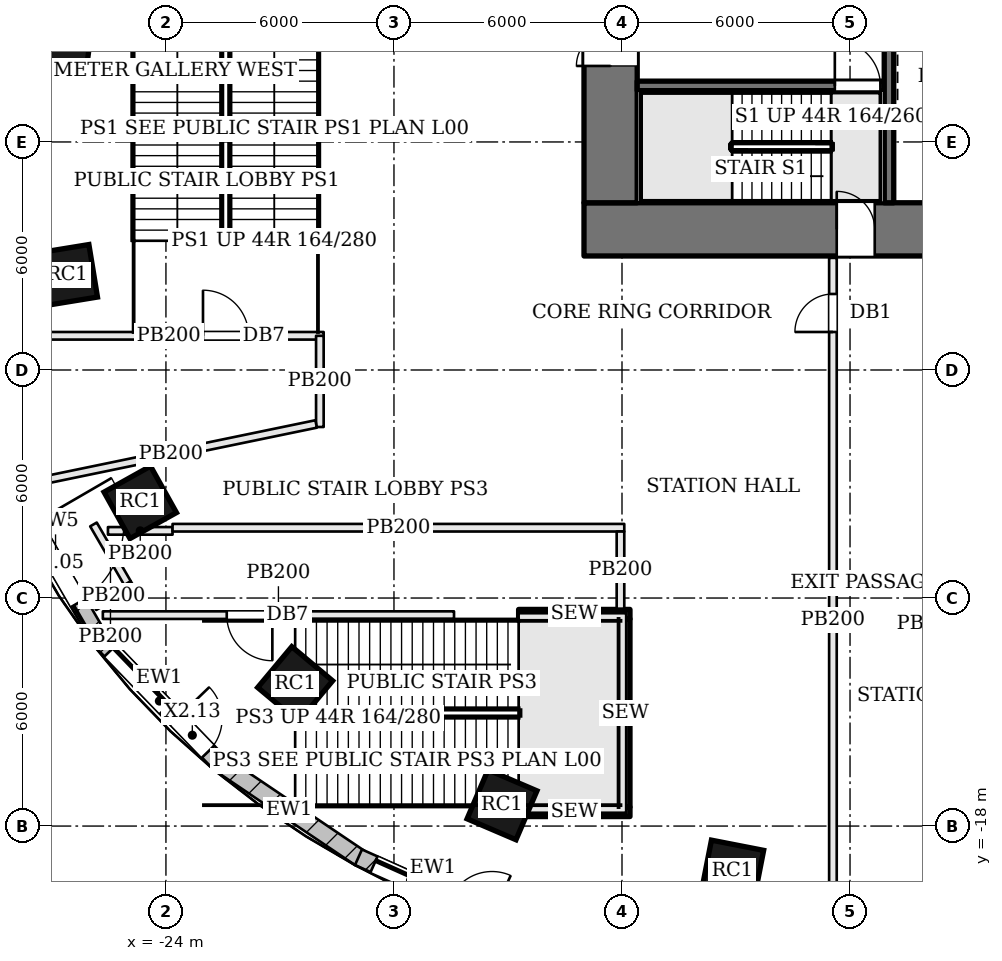
"""IFC4 building model, lengths in metres.
Left out: names, types, materials, properties, quantities, classifications, styles, units other than length and angle.
Written with IfcOpenShell. Run it as: python <this file> out.ifc"""

import sys

from ifc_helpers import new_model, si_unit, direction, frame, frame_2d, origin, origin_2d, place, context, subcontext, project, spatial, rectangle, extrude, element, fill, save


model = new_model("IFC4")
c1 = context("Model", 3, precision=1e-05, world=origin(), true_north=direction((0.0, 1.0)))
c2 = subcontext(c1, "Body", "Model", "MODEL_VIEW")
j1 = project(units=[si_unit("LENGTHUNIT", "METRE"), si_unit("PLANEANGLEUNIT", "RADIAN")], contexts=[c1])
p1 = place(None, origin())
s1 = spatial("IfcSite", under=j1, at=p1, CompositionType="ELEMENT")
p2 = place(p1, origin())
s2 = spatial("IfcBuilding", under=s1, at=p2, CompositionType="ELEMENT")
p3 = place(p2, origin())
s3 = spatial("IfcBuildingStorey", under=s2, at=p3, CompositionType="ELEMENT", Elevation=0.0)
p4 = place(p3, frame((-13.0, -2.3, 0.0), z_axis=(0.0, 0.0, 1.0), x_axis=(1.0, 0.0, 0.0)))
e1 = element("IfcWall", 1, at=p4, inside=s3, PredefinedType="SHEAR", context=c2, shape_type="SweptSolid", body=[
    extrude(rectangle(XDim=26.0, YDim=1.4, at=frame_2d((13.0, 0.0))), origin(), (0.0, 0.0, 1.0), 7.2),
])
p5 = place(p4, frame((9.275, 0.0, 0.0)))
e2 = element("IfcOpeningElement", 2, at=p5, cuts=e1, PredefinedType="OPENING", context=c2, shape_type="SweptSolid", body=[
    extrude(rectangle(XDim=0.9, YDim=2.1, at=frame_2d((0.45, 1.05))), frame((0.0, 0.71, 0.0), z_axis=(0.0, -1.0, 0.0), x_axis=(1.0, 0.0, 0.0)), (0.0, 0.0, 1.0), 1.42),
])
p6 = place(p4, frame((12.525, 0.0, 0.0)))
e3 = element("IfcOpeningElement", 3, at=p6, cuts=e1, PredefinedType="OPENING", context=c2, shape_type="SweptSolid", body=[
    extrude(rectangle(XDim=0.9, YDim=2.1, at=frame_2d((0.45, 1.05))), frame((0.0, 0.71, 0.0), z_axis=(0.0, -1.0, 0.0), x_axis=(1.0, 0.0, 0.0)), (0.0, 0.0, 1.0), 1.42),
])
p7 = place(p4, frame((15.0, 0.0, 0.0)))
e4 = element("IfcOpeningElement", 4, at=p7, cuts=e1, PredefinedType="OPENING", context=c2, shape_type="SweptSolid", body=[
    extrude(rectangle(XDim=1.0, YDim=2.1, at=frame_2d((0.5, 1.05))), frame((0.0, 0.71, 0.0), z_axis=(0.0, -1.0, 0.0), x_axis=(1.0, 0.0, 0.0)), (0.0, 0.0, 1.0), 1.42),
])
p8 = place(p4, frame((16.7, 0.0, 0.0)))
e5 = element("IfcOpeningElement", 5, at=p8, cuts=e1, PredefinedType="OPENING", context=c2, shape_type="SweptSolid", body=[
    extrude(rectangle(XDim=0.9, YDim=2.1, at=frame_2d((0.45, 1.05))), frame((0.0, 0.71, 0.0), z_axis=(0.0, -1.0, 0.0), x_axis=(1.0, 0.0, 0.0)), (0.0, 0.0, 1.0), 1.42),
])
p9 = place(p4, frame((6.65, 0.0, 0.0)))
e6 = element("IfcOpeningElement", 6, at=p9, cuts=e1, PredefinedType="OPENING", context=c2, shape_type="SweptSolid", body=[
    extrude(rectangle(XDim=1.0, YDim=2.1, at=frame_2d((0.5, 1.05))), frame((0.0, 0.71, 0.0), z_axis=(0.0, -1.0, 0.0), x_axis=(1.0, 0.0, 0.0)), (0.0, 0.0, 1.0), 1.42),
])
p10 = place(p4, frame((18.35, 0.0, 0.0)))
e7 = element("IfcOpeningElement", 7, at=p10, cuts=e1, PredefinedType="OPENING", context=c2, shape_type="SweptSolid", body=[
    extrude(rectangle(XDim=1.0, YDim=2.1, at=frame_2d((0.5, 1.05))), frame((0.0, 0.71, 0.0), z_axis=(0.0, -1.0, 0.0), x_axis=(1.0, 0.0, 0.0)), (0.0, 0.0, 1.0), 1.42),
])
p11 = place(p3, frame((-12.3, -1.6, 0.0), z_axis=(0.0, 0.0, 1.0), x_axis=(0.0, 1.0, 0.0)))
e8 = element("IfcWall", 8, at=p11, inside=s3, PredefinedType="SHEAR", context=c2, shape_type="SweptSolid", body=[
    extrude(rectangle(XDim=12.2, YDim=1.4, at=frame_2d((6.1, 0.0))), origin(), (0.0, 0.0, 1.0), 7.2),
])
p12 = place(p11, frame((3.6, 0.0, 0.0)))
e9 = element("IfcOpeningElement", 9, at=p12, cuts=e8, PredefinedType="OPENING", context=c2, shape_type="SweptSolid", body=[
    extrude(rectangle(XDim=1.8, YDim=2.1, at=frame_2d((0.9, 1.05))), frame((0.0, 0.71, 0.0), z_axis=(0.0, -1.0, 0.0), x_axis=(1.0, 0.0, 0.0)), (0.0, 0.0, 1.0), 1.42),
])
for number, where, z_axis, x_axis in (
    (10, (-26.684, 2.808, 0.0), (0.0, 0.0, 1.0), (-0.128, -0.992, 0.0)),
    (11, (-26.605, -3.503, 0.0), (0.0, 0.0, 1.0), (0.161, -0.987, 0.0)),
    (12, (-24.676, -9.483, 0.0), (0.0, 0.0, 1.0), (0.487, -0.873, 0.0)),
    (13, (-20.6, -14.266, 0.0), (0.0, 0.0, 1.0), (0.767, -0.641, 0.0)),
    (14, (-15.157, -17.441, 0.0), (0.0, 0.0, 1.0), (0.919, -0.394, 0.0)),
    (15, (-9.094, -19.192, 0.0), (0.0, 0.0, 1.0), (0.981, -0.192, 0.0)),
):
    element("IfcColumn", number, at=place(p3, frame(where, z_axis=z_axis, x_axis=x_axis)), inside=s3, PredefinedType="COLUMN", context=c2, shape_type="SweptSolid", body=[
        extrude(rectangle(XDim=1.4, YDim=1.4, at=origin_2d()), origin(), (0.0, 0.0, 1.0), 7.2),
    ])
p13 = place(p3, frame((-28.073, -9.072, 0.0), z_axis=(0.0, 0.0, 1.0), x_axis=(0.502106426501, -0.864805837438, 0.0)))
e16 = element("IfcWall", 16, at=p13, inside=s3, PredefinedType="SOLIDWALL", context=c2, shape_type="SweptSolid", body=[
    extrude(rectangle(XDim=4.657, YDim=0.45, at=frame_2d((2.328, 0.0))), origin(), (0.0, 0.0, 1.0), 3.55),
])
p14 = place(p13, frame((1.128, 0.0, 0.0)))
e17 = element("IfcOpeningElement", 17, at=p14, cuts=e16, PredefinedType="OPENING", context=c2, shape_type="SweptSolid", body=[
    extrude(rectangle(XDim=2.4, YDim=3.2, at=frame_2d((1.2, 1.6))), frame((0.0, 0.235, 0.0), z_axis=(0.0, -1.0, 0.0), x_axis=(1.0, 0.0, 0.0)), (0.0, 0.0, 1.0), 0.47),
])
p15 = place(p3, frame((-25.768, -13.056, 0.0), z_axis=(0.0, 0.0, 1.0), x_axis=(0.694191591241, -0.719790271294, 0.0)))
e18 = element("IfcWall", 18, at=p15, inside=s3, PredefinedType="SOLIDWALL", context=c2, shape_type="SweptSolid", body=[
    extrude(rectangle(XDim=4.597, YDim=0.45, at=frame_2d((2.298, 0.0))), origin(), (0.0, 0.0, 1.0), 6.95),
])
p16 = place(p15, frame((0.45, 0.0, 0.9)))
e19 = element("IfcOpeningElement", 19, at=p16, cuts=e18, PredefinedType="OPENING", context=c2, shape_type="SweptSolid", body=[
    extrude(rectangle(XDim=2.1, YDim=5.0, at=frame_2d((1.05, 2.5))), frame((0.0, 0.235, 0.0), z_axis=(0.0, -1.0, 0.0), x_axis=(1.0, 0.0, 0.0)), (0.0, 0.0, 1.0), 0.47),
])
p17 = place(p15, frame((2.947, 0.0, 0.0)))
e20 = element("IfcOpeningElement", 20, at=p17, cuts=e18, PredefinedType="OPENING", context=c2, shape_type="SweptSolid", body=[
    extrude(rectangle(XDim=1.2, YDim=2.4, at=frame_2d((0.6, 1.2))), frame((0.0, 0.235, 0.0), z_axis=(0.0, -1.0, 0.0), x_axis=(1.0, 0.0, 0.0)), (0.0, 0.0, 1.0), 0.47),
])
p18 = place(p3, frame((-22.613, -16.334, 0.0), z_axis=(0.0, 0.0, 1.0), x_axis=(0.828976924359, -0.559282807604, 0.0)))
e21 = element("IfcWall", 21, at=p18, inside=s3, PredefinedType="SOLIDWALL", context=c2, shape_type="SweptSolid", body=[
    extrude(rectangle(XDim=4.479, YDim=0.45, at=frame_2d((2.24, 0.0))), origin(), (0.0, 0.0, 1.0), 6.95),
])
p19 = place(p3, frame((-18.934, -18.821, 0.0), z_axis=(0.0, 0.0, 1.0), x_axis=(0.912571415594, -0.408917365052, 0.0)))
e22 = element("IfcWall", 22, at=p19, inside=s3, PredefinedType="SOLIDWALL", context=c2, shape_type="SweptSolid", body=[
    extrude(rectangle(XDim=4.301, YDim=0.45, at=frame_2d((2.15, 0.0))), origin(), (0.0, 0.0, 1.0), 6.95),
])
p20 = place(p19, frame((0.45, 0.0, 0.9)))
e23 = element("IfcOpeningElement", 23, at=p20, cuts=e22, PredefinedType="OPENING", context=c2, shape_type="SweptSolid", body=[
    extrude(rectangle(XDim=2.1, YDim=5.0, at=frame_2d((1.05, 2.5))), frame((0.0, 0.235, 0.0), z_axis=(0.0, -1.0, 0.0), x_axis=(1.0, 0.0, 0.0)), (0.0, 0.0, 1.0), 0.47),
])
p21 = place(p19, frame((2.651, 0.0, 0.0)))
e24 = element("IfcOpeningElement", 24, at=p21, cuts=e22, PredefinedType="OPENING", context=c2, shape_type="SweptSolid", body=[
    extrude(rectangle(XDim=1.2, YDim=2.4, at=frame_2d((0.6, 1.2))), frame((0.0, 0.235, 0.0), z_axis=(0.0, -1.0, 0.0), x_axis=(1.0, 0.0, 0.0)), (0.0, 0.0, 1.0), 0.47),
])
p22 = place(p3, frame((-11.6, 1.475, 0.0), z_axis=(0.0, 0.0, 1.0), x_axis=(1.0, 0.0, 0.0)))
e25 = element("IfcWall", 25, at=p22, inside=s3, PredefinedType="SOLIDWALL", context=c2, shape_type="SweptSolid", body=[
    extrude(rectangle(XDim=6.5, YDim=0.25, at=frame_2d((3.25, 0.0))), origin(), (0.0, 0.0, 1.0), 6.95),
])
p23 = place(p22, frame((5.2, 0.0, 0.0)))
e26 = element("IfcOpeningElement", 26, at=p23, cuts=e25, PredefinedType="OPENING", context=c2, shape_type="SweptSolid", body=[
    extrude(rectangle(XDim=1.2, YDim=2.1, at=frame_2d((0.6, 1.05))), frame((0.0, 0.135, 0.0), z_axis=(0.0, -1.0, 0.0), x_axis=(1.0, 0.0, 0.0)), (0.0, 0.0, 1.0), 0.27),
])
p24 = place(p3, frame((-4.975, -1.6, 0.0), z_axis=(0.0, 0.0, 1.0), x_axis=(0.0, 1.0, 0.0)))
e27 = element("IfcWall", 27, at=p24, inside=s3, PredefinedType="SOLIDWALL", context=c2, shape_type="SweptSolid", body=[
    extrude(rectangle(XDim=12.2, YDim=0.25, at=frame_2d((6.1, 0.0))), origin(), (0.0, 0.0, 1.0), 6.95),
])
p25 = place(p24, frame((4.65, 0.0, 0.0)))
e28 = element("IfcOpeningElement", 28, at=p25, cuts=e27, PredefinedType="OPENING", context=c2, shape_type="SweptSolid", body=[
    extrude(rectangle(XDim=1.2, YDim=2.1, at=frame_2d((0.6, 1.05))), frame((0.0, 0.135, 0.0), z_axis=(0.0, -1.0, 0.0), x_axis=(1.0, 0.0, 0.0)), (0.0, 0.0, 1.0), 0.27),
])
p26 = place(p3, frame((-4.9, 0.5, 0.0), z_axis=(0.0, 0.0, 1.0), x_axis=(1.0, 0.0, 0.0)))
e29 = element("IfcWall", 29, at=p26, inside=s3, PredefinedType="SOLIDWALL", context=c2, shape_type="SweptSolid", body=[
    extrude(rectangle(XDim=9.8, YDim=0.2, at=frame_2d((4.9, 0.0))), origin(), (0.0, 0.0, 1.0), 6.95),
])
p27 = place(p3, frame((-6.45, -22.097, 0.0), z_axis=(0.0, 0.0, 1.0), x_axis=(0.0, 1.0, 0.0)))
e30 = element("IfcWall", 30, at=p27, inside=s3, PredefinedType="PARTITIONING", context=c2, shape_type="SweptSolid", body=[
    extrude(rectangle(XDim=19.047, YDim=0.2, at=frame_2d((9.523, 0.0))), origin(), (0.0, 0.0, 1.0), 6.23),
])
p28 = place(p27, frame((17.097, 0.0, 0.0)))
e31 = element("IfcOpeningElement", 31, at=p28, cuts=e30, PredefinedType="OPENING", context=c2, shape_type="SweptSolid", body=[
    extrude(rectangle(XDim=1.0, YDim=2.1, at=frame_2d((0.5, 1.05))), frame((0.0, 0.11, 0.0), z_axis=(0.0, -1.0, 0.0), x_axis=(1.0, 0.0, 0.0)), (0.0, 0.0, 1.0), 0.22),
])
p29 = place(p3, frame((-28.0, -5.1, 0.0), z_axis=(0.0, 0.0, 1.0), x_axis=(1.0, 0.0, 0.0)))
e32 = element("IfcWall", 32, at=p29, inside=s3, PredefinedType="PARTITIONING", context=c2, shape_type="SweptSolid", body=[
    extrude(rectangle(XDim=8.15, YDim=0.2, at=frame_2d((4.075, 0.0))), origin(), (0.0, 0.0, 1.0), 6.23),
])
p30 = place(p29, frame((4.975, 0.0, 0.0)))
e33 = element("IfcOpeningElement", 33, at=p30, cuts=e32, PredefinedType="OPENING", context=c2, shape_type="SweptSolid", body=[
    extrude(rectangle(XDim=1.2, YDim=2.1, at=frame_2d((0.6, 1.05))), frame((0.0, 0.11, 0.0), z_axis=(0.0, -1.0, 0.0), x_axis=(1.0, 0.0, 0.0)), (0.0, 0.0, 1.0), 0.22),
])
p31 = place(p3, frame((-19.95, -5.1, 0.0), z_axis=(0.0, 0.0, 1.0), x_axis=(0.0, -1.0, 0.0)))
e34 = element("IfcWall", 34, at=p31, inside=s3, PredefinedType="PARTITIONING", context=c2, shape_type="SweptSolid", body=[
    extrude(rectangle(XDim=2.4, YDim=0.2, at=frame_2d((1.2, 0.0))), origin(), (0.0, 0.0, 1.0), 6.23),
])
p32 = place(p3, frame((-20.048, -7.42, 0.0), z_axis=(0.0, 0.0, 1.0), x_axis=(-0.979295927035, -0.202433908454, 0.0)))
e35 = element("IfcWall", 35, at=p32, inside=s3, PredefinedType="PARTITIONING", context=c2, shape_type="SweptSolid", body=[
    extrude(rectangle(XDim=7.805, YDim=0.2, at=frame_2d((3.903, 0.0))), origin(), (0.0, 0.0, 1.0), 6.23),
])
p33 = place(p3, frame((-25.526, -10.233, 0.0), z_axis=(0.0, 0.0, 1.0), x_axis=(1.0, 0.0, 0.0)))
e36 = element("IfcWall", 36, at=p33, inside=s3, PredefinedType="PARTITIONING", context=c2, shape_type="SweptSolid", body=[
    extrude(rectangle(XDim=1.7, YDim=0.2, at=frame_2d((0.85, 0.0))), origin(), (0.0, 0.0, 1.0), 6.23),
])
p34 = place(p3, frame((-23.826, -10.15, 0.0), z_axis=(0.0, 0.0, 1.0), x_axis=(1.0, 0.0, 0.0)))
e37 = element("IfcWall", 37, at=p34, inside=s3, PredefinedType="PARTITIONING", context=c2, shape_type="SweptSolid", body=[
    extrude(rectangle(XDim=11.886, YDim=0.2, at=frame_2d((5.943, 0.0))), origin(), (0.0, 0.0, 1.0), 6.23),
])
p35 = place(p3, frame((-12.04, -10.25, 0.0), z_axis=(0.0, 0.0, 1.0), x_axis=(0.0, -1.0, 0.0)))
e38 = element("IfcWall", 38, at=p35, inside=s3, PredefinedType="PARTITIONING", context=c2, shape_type="SweptSolid", body=[
    extrude(rectangle(XDim=2.03, YDim=0.2, at=frame_2d((1.015, 0.0))), origin(), (0.0, 0.0, 1.0), 6.23),
])
p36 = place(p3, frame((-16.42, -12.45, 0.0), z_axis=(0.0, 0.0, 1.0), x_axis=(-1.0, 0.0, 0.0)))
e39 = element("IfcWall", 39, at=p36, inside=s3, PredefinedType="PARTITIONING", context=c2, shape_type="SweptSolid", body=[
    extrude(rectangle(XDim=9.24, YDim=0.2, at=frame_2d((4.62, 0.0))), origin(), (0.0, 0.0, 1.0), 6.23),
])
p37 = place(p36, frame((4.78, 0.0, 0.0)))
e40 = element("IfcOpeningElement", 40, at=p37, cuts=e39, PredefinedType="OPENING", context=c2, shape_type="SweptSolid", body=[
    extrude(rectangle(XDim=1.2, YDim=2.1, at=frame_2d((0.6, 1.05))), frame((0.0, 0.11, 0.0), z_axis=(0.0, -1.0, 0.0), x_axis=(1.0, 0.0, 0.0)), (0.0, 0.0, 1.0), 0.22),
])
p38 = place(p3, frame((-25.885, -12.228, 0.0), z_axis=(0.0, 0.0, 1.0), x_axis=(0.864771360507, 0.502165803343, 0.0)))
e41 = element("IfcWall", 41, at=p38, inside=s3, PredefinedType="PARTITIONING", context=c2, shape_type="SweptSolid", body=[
    extrude(rectangle(XDim=1.167, YDim=0.2, at=frame_2d((0.583, 0.0))), origin(), (0.0, 0.0, 1.0), 6.23),
])
p39 = place(p3, frame((-25.012, -11.606, 0.0), z_axis=(0.0, 0.0, 1.0), x_axis=(-0.501996766252, 0.864869496903, 0.0)))
e42 = element("IfcWall", 42, at=p39, inside=s3, PredefinedType="PARTITIONING", context=c2, shape_type="SweptSolid", body=[
    extrude(rectangle(XDim=1.783, YDim=0.2, at=frame_2d((0.892, 0.0))), origin(), (0.0, 0.0, 1.0), 6.23),
])
p40 = place(p3, frame((-11.915, -17.5, 0.0), z_axis=(0.0, 0.0, 1.0), x_axis=(0.0, 1.0, 0.0)))
e43 = element("IfcWall", 43, at=p40, inside=s3, PredefinedType="SOLIDWALL", context=c2, shape_type="SweptSolid", body=[
    extrude(rectangle(XDim=4.95, YDim=0.25, at=frame_2d((2.475, 0.0))), origin(), (0.0, 0.0, 1.0), 6.95),
])
for number, where, z_axis, x_axis in (
    (44, (-14.72, -17.625, 0.0), (0.0, 0.0, 1.0), (1.0, 0.0, 0.0)),
    (45, (-14.72, -12.425, 0.0), (0.0, 0.0, 1.0), (1.0, 0.0, 0.0)),
):
    element("IfcWall", number, at=place(p3, frame(where, z_axis=z_axis, x_axis=x_axis)), inside=s3, PredefinedType="SOLIDWALL", context=c2, shape_type="SweptSolid", body=[
        extrude(rectangle(XDim=2.93, YDim=0.25, at=frame_2d((1.465, 0.0))), origin(), (0.0, 0.0, 1.0), 6.95),
    ])
p41 = place(p14, origin())
e46 = element("IfcDoor", 46, at=p41, inside=s3, OperationType="DOUBLE_DOOR_DOUBLE_SWING", PredefinedType="DOOR", context=c2, shape_type="SweptSolid", body=[
    extrude(rectangle(XDim=2.4, YDim=3.2, at=frame_2d((1.2, 1.6))), frame((0.0, 0.025, 0.0), z_axis=(0.0, -1.0, 0.0), x_axis=(1.0, 0.0, 0.0)), (0.0, 0.0, 1.0), 0.05),
])
fill(e17, e46)
p42 = place(p16, origin())
e47 = element("IfcWindow", 47, at=p42, inside=s3, PartitioningType="SINGLE_PANEL", PredefinedType="WINDOW", context=c2, shape_type="SweptSolid", body=[
    extrude(rectangle(XDim=2.1, YDim=5.0, at=frame_2d((1.05, 2.5))), frame((0.0, 0.135, 0.0), z_axis=(0.0, -1.0, 0.0), x_axis=(1.0, 0.0, 0.0)), (0.0, 0.0, 1.0), 0.06),
])
fill(e19, e47)
p43 = place(p17, frame((1.2, 0.0, 0.0), z_axis=(0.0, 0.0, 1.0), x_axis=(-1.0, 0.0, 0.0)))
e48 = element("IfcDoor", 48, at=p43, inside=s3, OperationType="SINGLE_SWING_LEFT", PredefinedType="DOOR", context=c2, shape_type="SweptSolid", body=[
    extrude(rectangle(XDim=1.2, YDim=2.4, at=frame_2d((0.6, 1.2))), frame((0.0, 0.025, 0.0), z_axis=(0.0, -1.0, 0.0), x_axis=(1.0, 0.0, 0.0)), (0.0, 0.0, 1.0), 0.05),
])
fill(e20, e48)
p44 = place(p20, origin())
e49 = element("IfcWindow", 49, at=p44, inside=s3, PartitioningType="SINGLE_PANEL", PredefinedType="WINDOW", context=c2, shape_type="SweptSolid", body=[
    extrude(rectangle(XDim=2.1, YDim=5.0, at=frame_2d((1.05, 2.5))), frame((0.0, 0.135, 0.0), z_axis=(0.0, -1.0, 0.0), x_axis=(1.0, 0.0, 0.0)), (0.0, 0.0, 1.0), 0.06),
])
fill(e23, e49)
p45 = place(p12, origin())
e50 = element("IfcDoor", 50, at=p45, inside=s3, OperationType="DOUBLE_DOOR_SINGLE_SWING", PredefinedType="DOOR", context=c2, shape_type="SweptSolid", body=[
    extrude(rectangle(XDim=1.8, YDim=2.1, at=frame_2d((0.9, 1.05))), frame((0.0, 0.025, 0.0), z_axis=(0.0, -1.0, 0.0), x_axis=(1.0, 0.0, 0.0)), (0.0, 0.0, 1.0), 0.05),
])
fill(e9, e50)
p46 = place(p23, origin())
e51 = element("IfcDoor", 51, at=p46, inside=s3, OperationType="SINGLE_SWING_LEFT", PredefinedType="DOOR", context=c2, shape_type="SweptSolid", body=[
    extrude(rectangle(XDim=1.2, YDim=2.1, at=frame_2d((0.6, 1.05))), frame((0.0, 0.025, 0.0), z_axis=(0.0, -1.0, 0.0), x_axis=(1.0, 0.0, 0.0)), (0.0, 0.0, 1.0), 0.05),
])
fill(e26, e51)
p47 = place(p9, origin())
e52 = element("IfcDoor", 52, at=p47, inside=s3, OperationType="SINGLE_SWING_LEFT", PredefinedType="DOOR", context=c2, shape_type="SweptSolid", body=[
    extrude(rectangle(XDim=1.0, YDim=2.1, at=frame_2d((0.5, 1.05))), frame((0.0, 0.025, 0.0), z_axis=(0.0, -1.0, 0.0), x_axis=(1.0, 0.0, 0.0)), (0.0, 0.0, 1.0), 0.05),
])
fill(e6, e52)
p48 = place(p28, origin())
e53 = element("IfcDoor", 53, at=p48, inside=s3, OperationType="SINGLE_SWING_LEFT", PredefinedType="DOOR", context=c2, shape_type="SweptSolid", body=[
    extrude(rectangle(XDim=1.0, YDim=2.1, at=frame_2d((0.5, 1.05))), frame((0.0, 0.025, 0.0), z_axis=(0.0, -1.0, 0.0), x_axis=(1.0, 0.0, 0.0)), (0.0, 0.0, 1.0), 0.05),
])
fill(e31, e53)
p49 = place(p30, origin())
e54 = element("IfcDoor", 54, at=p49, inside=s3, OperationType="SINGLE_SWING_LEFT", PredefinedType="DOOR", context=c2, shape_type="SweptSolid", body=[
    extrude(rectangle(XDim=1.2, YDim=2.1, at=frame_2d((0.6, 1.05))), frame((0.0, 0.025, 0.0), z_axis=(0.0, -1.0, 0.0), x_axis=(1.0, 0.0, 0.0)), (0.0, 0.0, 1.0), 0.05),
])
fill(e33, e54)
p50 = place(p37, origin())
e55 = element("IfcDoor", 55, at=p50, inside=s3, OperationType="SINGLE_SWING_LEFT", PredefinedType="DOOR", context=c2, shape_type="SweptSolid", body=[
    extrude(rectangle(XDim=1.2, YDim=2.1, at=frame_2d((0.6, 1.05))), frame((0.0, 0.025, 0.0), z_axis=(0.0, -1.0, 0.0), x_axis=(1.0, 0.0, 0.0)), (0.0, 0.0, 1.0), 0.05),
])
fill(e40, e55)
save(model, sys.argv[1])
